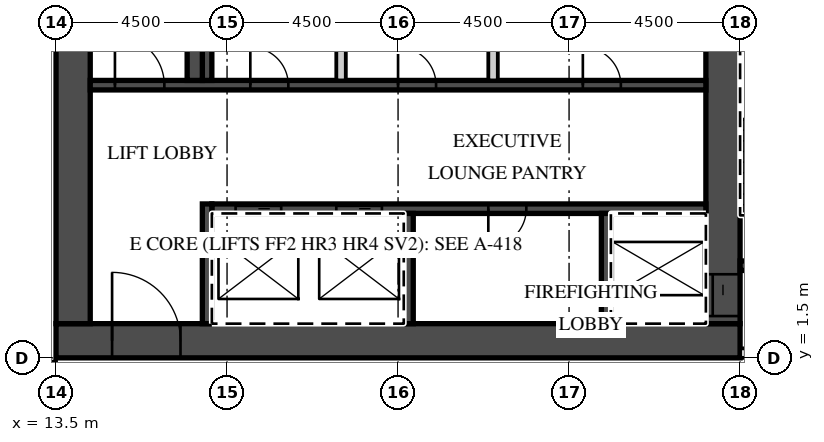
"""IFC4 building model, lengths in metres.
Left out: names, types, materials, properties, quantities, classifications, styles, units other than length and angle.
Written with IfcOpenShell. Run it as: python <this file> out.ifc"""

import sys

from ifc_helpers import new_model, si_unit, direction, frame, frame_2d, origin, place, context, subcontext, project, spatial, rectangle, extrude, element, fill, save


model = new_model("IFC4")
c1 = context("Model", 3, precision=1e-05, world=origin(), true_north=direction((0.0, 1.0)))
c2 = subcontext(c1, "Body", "Model", "MODEL_VIEW")
j1 = project(units=[si_unit("LENGTHUNIT", "METRE"), si_unit("PLANEANGLEUNIT", "RADIAN")], contexts=[c1])
p1 = place(None, origin())
s1 = spatial("IfcSite", under=j1, at=p1, CompositionType="ELEMENT")
p2 = place(p1, origin())
s2 = spatial("IfcBuilding", under=s1, at=p2, CompositionType="ELEMENT")
p3 = place(p2, frame((0.0, 0.0, 301.5)))
s3 = spatial("IfcBuildingStorey", under=s2, at=p3, CompositionType="ELEMENT", Elevation=301.5)
p4 = place(p3, frame((-39.909, 1.3, 0.0), z_axis=(0.0, 0.0, 1.0), x_axis=(1.0, 0.0, 0.0)))
e1 = element("IfcWall", 1, at=p4, inside=s3, PredefinedType="PARTITIONING", context=c2, shape_type="SweptSolid", body=[
    extrude(rectangle(XDim=53.409, YDim=0.2, at=frame_2d((26.705, 0.0))), origin(), (0.0, 0.0, 1.0), 3.02),
])
p5 = place(p4, frame((0.15, 0.0, 0.0)))
e2 = element("IfcOpeningElement", 2, at=p5, cuts=e1, PredefinedType="OPENING", context=c2, shape_type="SweptSolid", body=[
    extrude(rectangle(XDim=0.9, YDim=2.1, at=frame_2d((0.45, 1.05))), frame((0.0, 0.11, 0.0), z_axis=(0.0, -1.0, 0.0), x_axis=(1.0, 0.0, 0.0)), (0.0, 0.0, 1.0), 0.22),
])
p6 = place(p4, frame((9.271, 0.0, 0.0)))
e3 = element("IfcOpeningElement", 3, at=p6, cuts=e1, PredefinedType="OPENING", context=c2, shape_type="SweptSolid", body=[
    extrude(rectangle(XDim=1.2, YDim=2.1, at=frame_2d((0.6, 1.05))), frame((0.0, 0.11, 0.0), z_axis=(0.0, -1.0, 0.0), x_axis=(1.0, 0.0, 0.0)), (0.0, 0.0, 1.0), 0.22),
])
p7 = place(p4, frame((13.484, 0.0, 0.0)))
e4 = element("IfcOpeningElement", 4, at=p7, cuts=e1, PredefinedType="OPENING", context=c2, shape_type="SweptSolid", body=[
    extrude(rectangle(XDim=1.0, YDim=2.1, at=frame_2d((0.5, 1.05))), frame((0.0, 0.11, 0.0), z_axis=(0.0, -1.0, 0.0), x_axis=(1.0, 0.0, 0.0)), (0.0, 0.0, 1.0), 0.22),
])
p8 = place(p4, frame((17.959, 0.0, 0.0)))
e5 = element("IfcOpeningElement", 5, at=p8, cuts=e1, PredefinedType="OPENING", context=c2, shape_type="SweptSolid", body=[
    extrude(rectangle(XDim=1.0, YDim=2.1, at=frame_2d((0.5, 1.05))), frame((0.0, 0.11, 0.0), z_axis=(0.0, -1.0, 0.0), x_axis=(1.0, 0.0, 0.0)), (0.0, 0.0, 1.0), 0.22),
])
p9 = place(p4, frame((24.859, 0.0, 0.0)))
e6 = element("IfcOpeningElement", 6, at=p9, cuts=e1, PredefinedType="OPENING", context=c2, shape_type="SweptSolid", body=[
    extrude(rectangle(XDim=1.0, YDim=2.1, at=frame_2d((0.5, 1.05))), frame((0.0, 0.11, 0.0), z_axis=(0.0, -1.0, 0.0), x_axis=(1.0, 0.0, 0.0)), (0.0, 0.0, 1.0), 0.22),
])
p10 = place(p4, frame((29.334, 0.0, 0.0)))
e7 = element("IfcOpeningElement", 7, at=p10, cuts=e1, PredefinedType="OPENING", context=c2, shape_type="SweptSolid", body=[
    extrude(rectangle(XDim=1.0, YDim=2.1, at=frame_2d((0.5, 1.05))), frame((0.0, 0.11, 0.0), z_axis=(0.0, -1.0, 0.0), x_axis=(1.0, 0.0, 0.0)), (0.0, 0.0, 1.0), 0.22),
])
p11 = place(p4, frame((36.271, 0.0, 0.0)))
e8 = element("IfcOpeningElement", 8, at=p11, cuts=e1, PredefinedType="OPENING", context=c2, shape_type="SweptSolid", body=[
    extrude(rectangle(XDim=1.2, YDim=2.1, at=frame_2d((0.6, 1.05))), frame((0.0, 0.11, 0.0), z_axis=(0.0, -1.0, 0.0), x_axis=(1.0, 0.0, 0.0)), (0.0, 0.0, 1.0), 0.22),
])
p12 = place(p4, frame((40.484, 0.0, 0.0)))
e9 = element("IfcOpeningElement", 9, at=p12, cuts=e1, PredefinedType="OPENING", context=c2, shape_type="SweptSolid", body=[
    extrude(rectangle(XDim=1.0, YDim=2.1, at=frame_2d((0.5, 1.05))), frame((0.0, 0.11, 0.0), z_axis=(0.0, -1.0, 0.0), x_axis=(1.0, 0.0, 0.0)), (0.0, 0.0, 1.0), 0.22),
])
p13 = place(p4, frame((47.334, 0.0, 0.0)))
e10 = element("IfcOpeningElement", 10, at=p13, cuts=e1, PredefinedType="OPENING", context=c2, shape_type="SweptSolid", body=[
    extrude(rectangle(XDim=1.0, YDim=2.1, at=frame_2d((0.5, 1.05))), frame((0.0, 0.11, 0.0), z_axis=(0.0, -1.0, 0.0), x_axis=(1.0, 0.0, 0.0)), (0.0, 0.0, 1.0), 0.22),
])
p14 = place(p4, frame((51.834, 0.0, 0.0)))
e11 = element("IfcOpeningElement", 11, at=p14, cuts=e1, PredefinedType="OPENING", context=c2, shape_type="SweptSolid", body=[
    extrude(rectangle(XDim=1.0, YDim=2.1, at=frame_2d((0.5, 1.05))), frame((0.0, 0.11, 0.0), z_axis=(0.0, -1.0, 0.0), x_axis=(1.0, 0.0, 0.0)), (0.0, 0.0, 1.0), 0.22),
])
p15 = place(p3, frame((13.5, 1.95, 0.0), z_axis=(0.0, 0.0, 1.0), x_axis=(1.0, 0.0, 0.0)))
e12 = element("IfcWall", 12, at=p15, inside=s3, PredefinedType="SHEAR", context=c2, shape_type="SweptSolid", body=[
    extrude(rectangle(XDim=18.0, YDim=0.9, at=frame_2d((9.0, 0.0))), origin(), (0.0, 0.0, 1.0), 3.02),
])
p16 = place(p15, frame((1.475, 0.0, 0.0)))
e13 = element("IfcOpeningElement", 13, at=p16, cuts=e12, PredefinedType="OPENING", context=c2, shape_type="SweptSolid", body=[
    extrude(rectangle(XDim=1.8, YDim=2.1, at=frame_2d((0.9, 1.05))), frame((0.0, 0.46, 0.0), z_axis=(0.0, -1.0, 0.0), x_axis=(1.0, 0.0, 0.0)), (0.0, 0.0, 1.0), 0.92),
])
p17 = place(p3, frame((31.05, 2.4, 0.0), z_axis=(0.0, 0.0, 1.0), x_axis=(0.0, 1.0, 0.0)))
e14 = element("IfcWall", 14, at=p17, inside=s3, PredefinedType="SHEAR", context=c2, shape_type="SweptSolid", body=[
    extrude(rectangle(XDim=12.8, YDim=0.9, at=frame_2d((6.4, 0.0))), origin(), (0.0, 0.0, 1.0), 3.02),
])
p18 = place(p17, frame((0.2, 0.0, 0.0)))
e15 = element("IfcOpeningElement", 15, at=p18, cuts=e14, PredefinedType="OPENING", context=c2, shape_type="SweptSolid", body=[
    extrude(rectangle(XDim=1.1, YDim=2.1, at=frame_2d((0.55, 1.05))), frame((0.0, 0.46, 0.0), z_axis=(0.0, -1.0, 0.0), x_axis=(1.0, 0.0, 0.0)), (0.0, 0.0, 1.0), 0.92),
])
p19 = place(p3, frame((13.95, 2.4, 0.0), z_axis=(0.0, 0.0, 1.0), x_axis=(0.0, 1.0, 0.0)))
e16 = element("IfcWall", 16, at=p19, inside=s3, PredefinedType="SHEAR", context=c2, shape_type="SweptSolid", body=[
    extrude(rectangle(XDim=12.2, YDim=0.9, at=frame_2d((6.1, 0.0))), origin(), (0.0, 0.0, 1.0), 3.02),
])
p20 = place(p3, frame((17.6, 5.425, 0.0), z_axis=(0.0, 0.0, 1.0), x_axis=(1.0, 0.0, 0.0)))
e17 = element("IfcWall", 17, at=p20, inside=s3, PredefinedType="SHEAR", context=c2, shape_type="SweptSolid", body=[
    extrude(rectangle(XDim=13.0, YDim=0.25, at=frame_2d((6.5, 0.0))), origin(), (0.0, 0.0, 1.0), 3.02),
])
p21 = place(p20, frame((3.275, 0.0, 0.0)))
e18 = element("IfcOpeningElement", 18, at=p21, cuts=e17, PredefinedType="OPENING", context=c2, shape_type="SweptSolid", body=[
    extrude(rectangle(XDim=1.2, YDim=2.1, at=frame_2d((0.6, 1.05))), frame((0.0, 0.135, 0.0), z_axis=(0.0, -1.0, 0.0), x_axis=(1.0, 0.0, 0.0)), (0.0, 0.0, 1.0), 0.27),
])
p22 = place(p20, frame((0.625, 0.0, 0.0)))
e19 = element("IfcOpeningElement", 19, at=p22, cuts=e17, PredefinedType="OPENING", context=c2, shape_type="SweptSolid", body=[
    extrude(rectangle(XDim=1.2, YDim=2.1, at=frame_2d((0.6, 1.05))), frame((0.0, 0.135, 0.0), z_axis=(0.0, -1.0, 0.0), x_axis=(1.0, 0.0, 0.0)), (0.0, 0.0, 1.0), 0.27),
])
p23 = place(p20, frame((7.275, 0.0, 0.0)))
e20 = element("IfcOpeningElement", 20, at=p23, cuts=e17, PredefinedType="OPENING", context=c2, shape_type="SweptSolid", body=[
    extrude(rectangle(XDim=1.0, YDim=2.1, at=frame_2d((0.5, 1.05))), frame((0.0, 0.135, 0.0), z_axis=(0.0, -1.0, 0.0), x_axis=(1.0, 0.0, 0.0)), (0.0, 0.0, 1.0), 0.27),
])
p24 = place(p3, frame((17.475, 2.4, 0.0), z_axis=(0.0, 0.0, 1.0), x_axis=(0.0, 1.0, 0.0)))
e21 = element("IfcWall", 21, at=p24, inside=s3, PredefinedType="SHEAR", context=c2, shape_type="SweptSolid", body=[
    extrude(rectangle(XDim=3.15, YDim=0.25, at=frame_2d((1.575, 0.0))), origin(), (0.0, 0.0, 1.0), 3.02),
])
for number, where, z_axis, x_axis in (
    (22, (27.975, 2.4, 0.0), (0.0, 0.0, 1.0), (0.0, 1.0, 0.0)),
    (23, (22.775, 2.4, 0.0), (0.0, 0.0, 1.0), (0.0, 1.0, 0.0)),
):
    element("IfcWall", number, at=place(p3, frame(where, z_axis=z_axis, x_axis=x_axis)), inside=s3, PredefinedType="SHEAR", context=c2, shape_type="SweptSolid", body=[
        extrude(rectangle(XDim=2.9, YDim=0.25, at=frame_2d((1.45, 0.0))), origin(), (0.0, 0.0, 1.0), 3.02),
    ])
p25 = place(p3, frame((14.4, 8.675, 0.0), z_axis=(0.0, 0.0, 1.0), x_axis=(1.0, 0.0, 0.0)))
e24 = element("IfcWall", 24, at=p25, inside=s3, PredefinedType="SHEAR", context=c2, shape_type="SweptSolid", body=[
    extrude(rectangle(XDim=16.2, YDim=0.25, at=frame_2d((8.1, 0.0))), origin(), (0.0, 0.0, 1.0), 3.02),
])
p26 = place(p25, frame((0.65, 0.0, 0.0)))
e25 = element("IfcOpeningElement", 25, at=p26, cuts=e24, PredefinedType="OPENING", context=c2, shape_type="SweptSolid", body=[
    extrude(rectangle(XDim=1.3, YDim=2.1, at=frame_2d((0.65, 1.05))), frame((0.0, 0.135, 0.0), z_axis=(0.0, -1.0, 0.0), x_axis=(1.0, 0.0, 0.0)), (0.0, 0.0, 1.0), 0.27),
])
p27 = place(p25, frame((12.962, 0.0, 0.0)))
e26 = element("IfcOpeningElement", 26, at=p27, cuts=e24, PredefinedType="OPENING", context=c2, shape_type="SweptSolid", body=[
    extrude(rectangle(XDim=1.0, YDim=2.1, at=frame_2d((0.5, 1.05))), frame((0.0, 0.135, 0.0), z_axis=(0.0, -1.0, 0.0), x_axis=(1.0, 0.0, 0.0)), (0.0, 0.0, 1.0), 0.27),
])
p28 = place(p25, frame((8.1, 0.0, 0.0)))
e27 = element("IfcOpeningElement", 27, at=p28, cuts=e24, PredefinedType="OPENING", context=c2, shape_type="SweptSolid", body=[
    extrude(rectangle(XDim=1.0, YDim=2.1, at=frame_2d((0.5, 1.05))), frame((0.0, 0.135, 0.0), z_axis=(0.0, -1.0, 0.0), x_axis=(1.0, 0.0, 0.0)), (0.0, 0.0, 1.0), 0.27),
])
p29 = place(p25, frame((4.212, 0.0, 0.0)))
e28 = element("IfcOpeningElement", 28, at=p29, cuts=e24, PredefinedType="OPENING", context=c2, shape_type="SweptSolid", body=[
    extrude(rectangle(XDim=1.0, YDim=2.1, at=frame_2d((0.5, 1.05))), frame((0.0, 0.135, 0.0), z_axis=(0.0, -1.0, 0.0), x_axis=(1.0, 0.0, 0.0)), (0.0, 0.0, 1.0), 0.27),
])
p30 = place(p3, frame((17.475, 8.8, 0.0), z_axis=(0.0, 0.0, 1.0), x_axis=(0.0, 1.0, 0.0)))
e29 = element("IfcWall", 29, at=p30, inside=s3, PredefinedType="SHEAR", context=c2, shape_type="SweptSolid", body=[
    extrude(rectangle(XDim=2.9, YDim=0.25, at=frame_2d((1.45, 0.0))), origin(), (0.0, 0.0, 1.0), 3.02),
])
for number, where, z_axis, x_axis in (
    (30, (25.0, 8.8, 0.0), (0.0, 0.0, 1.0), (0.0, 1.0, 0.0)),
    (31, (21.0, 8.8, 0.0), (0.0, 0.0, 1.0), (0.0, 1.0, 0.0)),
):
    element("IfcWall", number, at=place(p3, frame(where, z_axis=z_axis, x_axis=x_axis)), inside=s3, PredefinedType="PARTITIONING", context=c2, shape_type="SweptSolid", body=[
        extrude(rectangle(XDim=2.9, YDim=0.25, at=frame_2d((1.45, 0.0))), origin(), (0.0, 0.0, 1.0), 3.02),
    ])
p31 = place(p3, frame((17.15, 8.8, 0.0), z_axis=(0.0, 0.0, 1.0), x_axis=(0.0, 1.0, 0.0)))
e32 = element("IfcWall", 32, at=p31, inside=s3, PredefinedType="SHEAR", context=c2, shape_type="SweptSolid", body=[
    extrude(rectangle(XDim=5.8, YDim=0.4, at=frame_2d((2.9, 0.0))), origin(), (0.0, 0.0, 1.0), 3.02),
])
p32 = place(p3, frame((31.5, 1.625, 0.0), z_axis=(0.0, 0.0, 1.0), x_axis=(1.0, 0.0, 0.0)))
e33 = element("IfcWall", 33, at=p32, inside=s3, PredefinedType="PARTITIONING", context=c2, shape_type="SweptSolid", body=[
    extrude(rectangle(XDim=5.012, YDim=0.25, at=frame_2d((2.506, 0.0))), origin(), (0.0, 0.0, 1.0), 3.02),
])
p33 = place(p32, frame((0.625, 0.0, 0.0)))
e34 = element("IfcOpeningElement", 34, at=p33, cuts=e33, PredefinedType="OPENING", context=c2, shape_type="SweptSolid", body=[
    extrude(rectangle(XDim=1.3, YDim=2.1, at=frame_2d((0.65, 1.05))), frame((0.0, 0.135, 0.0), z_axis=(0.0, -1.0, 0.0), x_axis=(1.0, 0.0, 0.0)), (0.0, 0.0, 1.0), 0.27),
])
p34 = place(p32, frame((3.25, 0.0, 0.0)))
e35 = element("IfcOpeningElement", 35, at=p34, cuts=e33, PredefinedType="OPENING", context=c2, shape_type="SweptSolid", body=[
    extrude(rectangle(XDim=1.1, YDim=2.1, at=frame_2d((0.55, 1.05))), frame((0.0, 0.135, 0.0), z_axis=(0.0, -1.0, 0.0), x_axis=(1.0, 0.0, 0.0)), (0.0, 0.0, 1.0), 0.27),
])
p35 = place(p3, frame((31.5, 3.925, 0.0), z_axis=(0.0, 0.0, 1.0), x_axis=(1.0, 0.0, 0.0)))
e36 = element("IfcWall", 36, at=p35, inside=s3, PredefinedType="SHEAR", context=c2, shape_type="SweptSolid", body=[
    extrude(rectangle(XDim=2.55, YDim=0.25, at=frame_2d((1.275, 0.0))), origin(), (0.0, 0.0, 1.0), 3.02),
])
p36 = place(p35, frame((0.625, 0.0, 0.0)))
e37 = element("IfcOpeningElement", 37, at=p36, cuts=e36, PredefinedType="OPENING", context=c2, shape_type="SweptSolid", body=[
    extrude(rectangle(XDim=1.3, YDim=2.1, at=frame_2d((0.65, 1.05))), frame((0.0, 0.135, 0.0), z_axis=(0.0, -1.0, 0.0), x_axis=(1.0, 0.0, 0.0)), (0.0, 0.0, 1.0), 0.27),
])
p37 = place(p21, origin())
e38 = element("IfcDoor", 38, at=p37, inside=s3, OperationType="SLIDING_TO_RIGHT", PredefinedType="DOOR", context=c2, shape_type="SweptSolid", body=[
    extrude(rectangle(XDim=1.2, YDim=2.1, at=frame_2d((0.6, 1.05))), frame((0.0, 0.025, 0.0), z_axis=(0.0, -1.0, 0.0), x_axis=(1.0, 0.0, 0.0)), (0.0, 0.0, 1.0), 0.05),
])
fill(e18, e38)
p38 = place(p22, origin())
e39 = element("IfcDoor", 39, at=p38, inside=s3, OperationType="SLIDING_TO_LEFT", PredefinedType="DOOR", context=c2, shape_type="SweptSolid", body=[
    extrude(rectangle(XDim=1.2, YDim=2.1, at=frame_2d((0.6, 1.05))), frame((0.0, 0.025, 0.0), z_axis=(0.0, -1.0, 0.0), x_axis=(1.0, 0.0, 0.0)), (0.0, 0.0, 1.0), 0.05),
])
fill(e19, e39)
p39 = place(p18, origin())
e40 = element("IfcDoor", 40, at=p39, inside=s3, OperationType="SLIDING_TO_LEFT", PredefinedType="DOOR", context=c2, shape_type="SweptSolid", body=[
    extrude(rectangle(XDim=1.1, YDim=2.1, at=frame_2d((0.55, 1.05))), frame((0.0, 0.025, 0.0), z_axis=(0.0, -1.0, 0.0), x_axis=(1.0, 0.0, 0.0)), (0.0, 0.0, 1.0), 0.05),
])
fill(e15, e40)
p40 = place(p16, origin())
e41 = element("IfcDoor", 41, at=p40, inside=s3, OperationType="DOUBLE_DOOR_DOUBLE_SWING", PredefinedType="DOOR", context=c2, shape_type="SweptSolid", body=[
    extrude(rectangle(XDim=1.8, YDim=2.1, at=frame_2d((0.9, 1.05))), frame((0.0, 0.025, 0.0), z_axis=(0.0, -1.0, 0.0), x_axis=(1.0, 0.0, 0.0)), (0.0, 0.0, 1.0), 0.05),
])
fill(e13, e41)
p41 = place(p26, origin())
e42 = element("IfcDoor", 42, at=p41, inside=s3, OperationType="SINGLE_SWING_LEFT", PredefinedType="DOOR", context=c2, shape_type="SweptSolid", body=[
    extrude(rectangle(XDim=1.3, YDim=2.1, at=frame_2d((0.65, 1.05))), frame((0.0, 0.025, 0.0), z_axis=(0.0, -1.0, 0.0), x_axis=(1.0, 0.0, 0.0)), (0.0, 0.0, 1.0), 0.05),
])
fill(e25, e42)
p42 = place(p27, origin())
e43 = element("IfcDoor", 43, at=p42, inside=s3, OperationType="SINGLE_SWING_LEFT", PredefinedType="DOOR", context=c2, shape_type="SweptSolid", body=[
    extrude(rectangle(XDim=1.0, YDim=2.1, at=frame_2d((0.5, 1.05))), frame((0.0, 0.025, 0.0), z_axis=(0.0, -1.0, 0.0), x_axis=(1.0, 0.0, 0.0)), (0.0, 0.0, 1.0), 0.05),
])
fill(e26, e43)
p43 = place(p28, origin())
e44 = element("IfcDoor", 44, at=p43, inside=s3, OperationType="SINGLE_SWING_LEFT", PredefinedType="DOOR", context=c2, shape_type="SweptSolid", body=[
    extrude(rectangle(XDim=1.0, YDim=2.1, at=frame_2d((0.5, 1.05))), frame((0.0, 0.025, 0.0), z_axis=(0.0, -1.0, 0.0), x_axis=(1.0, 0.0, 0.0)), (0.0, 0.0, 1.0), 0.05),
])
fill(e27, e44)
p44 = place(p29, origin())
e45 = element("IfcDoor", 45, at=p44, inside=s3, OperationType="SINGLE_SWING_LEFT", PredefinedType="DOOR", context=c2, shape_type="SweptSolid", body=[
    extrude(rectangle(XDim=1.0, YDim=2.1, at=frame_2d((0.5, 1.05))), frame((0.0, 0.025, 0.0), z_axis=(0.0, -1.0, 0.0), x_axis=(1.0, 0.0, 0.0)), (0.0, 0.0, 1.0), 0.05),
])
fill(e28, e45)
p45 = place(p23, origin())
e46 = element("IfcDoor", 46, at=p45, inside=s3, OperationType="SINGLE_SWING_LEFT", PredefinedType="DOOR", context=c2, shape_type="SweptSolid", body=[
    extrude(rectangle(XDim=1.0, YDim=2.1, at=frame_2d((0.5, 1.05))), frame((0.0, 0.025, 0.0), z_axis=(0.0, -1.0, 0.0), x_axis=(1.0, 0.0, 0.0)), (0.0, 0.0, 1.0), 0.05),
])
fill(e20, e46)
save(model, sys.argv[1])
